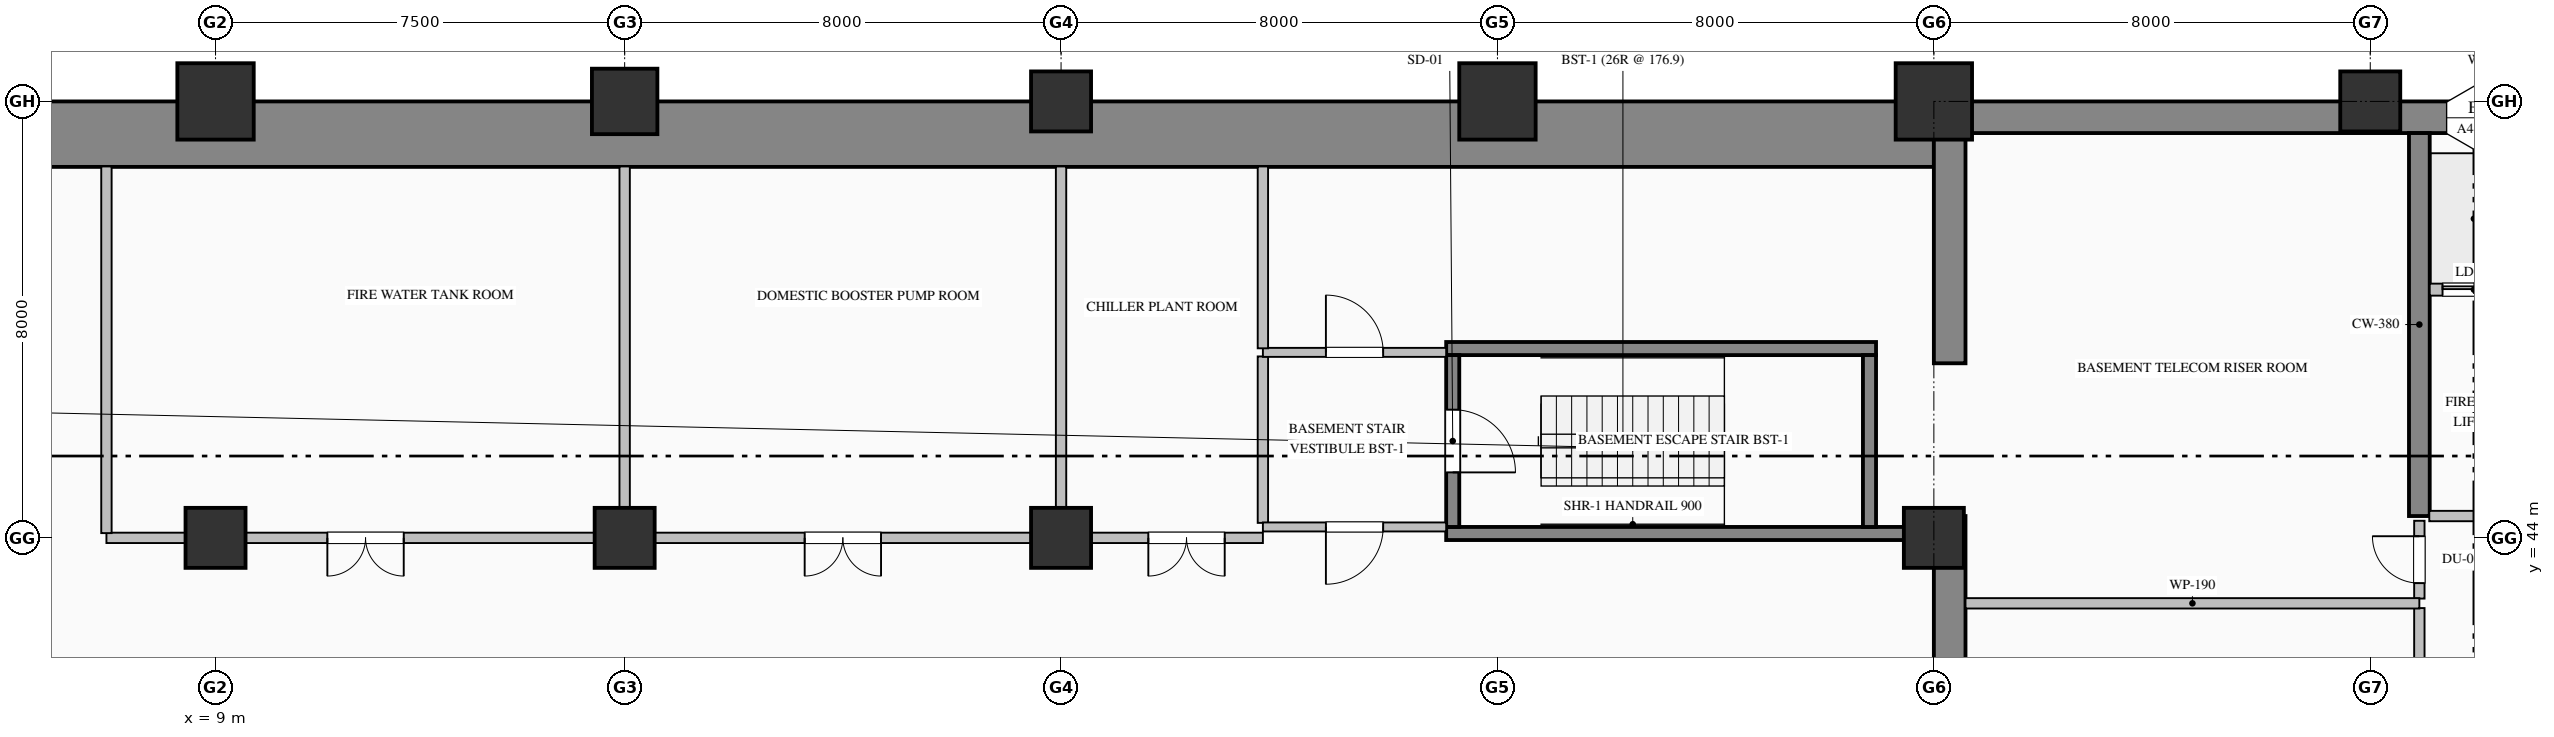
"""IFC4 building model, lengths in metres.
Left out: names, types, materials, properties, quantities, classifications, styles, units other than length and angle.
Written with IfcOpenShell. Run it as: python <this file> out.ifc"""

import sys

from ifc_helpers import new_model, si_unit, direction, frame, frame_2d, origin, origin_2d, place, context, subcontext, project, spatial, rectangle, hollow_rectangle, hollow_circle, extrude, element, fill, save


model = new_model("IFC4")
c1 = context("Model", 3, precision=1e-05, world=origin(), true_north=direction((0.0, 1.0)))
c2 = subcontext(c1, "Body", "Model", "MODEL_VIEW")
j1 = project(units=[si_unit("LENGTHUNIT", "METRE"), si_unit("PLANEANGLEUNIT", "RADIAN")], contexts=[c1])
p1 = place(None, origin())
s1 = spatial("IfcSite", under=j1, at=p1, CompositionType="ELEMENT")
p2 = place(p1, origin())
s2 = spatial("IfcBuilding", under=s1, at=p2, CompositionType="ELEMENT")
p3 = place(p2, frame((0.0, 0.0, -13.8)))
s3 = spatial("IfcBuildingStorey", under=s2, at=p3, CompositionType="ELEMENT", Elevation=-13.8)
p4 = place(p3, frame((-1.2, 51.4, -0.5), z_axis=(0.0, 0.0, 1.0), x_axis=(1.0, 0.0, 0.0)))
e1 = element("IfcWall", 1, at=p4, inside=s3, PredefinedType="USERDEFINED", context=c2, shape_type="SweptSolid", body=[
    extrude(rectangle(XDim=41.7, YDim=1.2, at=frame_2d((20.85, 0.0))), origin(), (0.0, 0.0, 1.0), 5.1),
])
p5 = place(p3, frame((40.5, 51.71, -0.5), z_axis=(0.0, 0.0, 1.0), x_axis=(1.0, 0.0, 0.0)))
e2 = element("IfcWall", 2, at=p5, inside=s3, PredefinedType="SHEAR", context=c2, shape_type="SweptSolid", body=[
    extrude(rectangle(XDim=23.5, YDim=0.58, at=frame_2d((11.75, 0.0))), origin(), (0.0, 0.0, 1.0), 4.74),
])
p6 = place(p3, frame((40.79, 36.58, -0.5), z_axis=(0.0, 0.0, 1.0), x_axis=(0.0, 1.0, 0.0)))
e3 = element("IfcWall", 3, at=p6, inside=s3, PredefinedType="SHEAR", context=c2, shape_type="SweptSolid", body=[
    extrude(rectangle(XDim=7.82, YDim=0.58, at=frame_2d((3.91, 0.0))), origin(), (0.0, 0.0, 1.0), 4.74),
])
p7 = place(p3, frame((40.79, 47.2, -0.5), z_axis=(0.0, 0.0, 1.0), x_axis=(0.0, 1.0, 0.0)))
e4 = element("IfcWall", 4, at=p7, inside=s3, PredefinedType="SHEAR", context=c2, shape_type="SweptSolid", body=[
    extrude(rectangle(XDim=4.22, YDim=0.58, at=frame_2d((2.11, 0.0))), origin(), (0.0, 0.0, 1.0), 4.74),
])
p8 = place(p3, frame((49.4, 44.4, -0.5), z_axis=(0.0, 0.0, 1.0), x_axis=(0.0, 1.0, 0.0)))
e5 = element("IfcWall", 5, at=p8, inside=s3, PredefinedType="SHEAR", context=c2, shape_type="SweptSolid", body=[
    extrude(rectangle(XDim=7.02, YDim=0.38, at=frame_2d((3.51, 0.0))), origin(), (0.0, 0.0, 1.0), 4.74),
])
p9 = place(p3, frame((9.0, 44.0, -0.5), z_axis=(0.0, 0.0, 1.0), x_axis=(1.0, 0.0, 0.0)))
e6 = element("IfcColumn", 6, at=p9, inside=s3, PredefinedType="COLUMN", context=c2, shape_type="SweptSolid", body=[
    extrude(rectangle(XDim=1.1, YDim=1.1, at=origin_2d()), origin(), (0.0, 0.0, 1.0), 5.1),
])
p10 = place(p3, frame((9.0, 52.0, -0.5), z_axis=(0.0, 0.0, 1.0), x_axis=(1.0, 0.0, 0.0)))
e7 = element("IfcColumn", 7, at=p10, inside=s3, PredefinedType="COLUMN", context=c2, shape_type="SweptSolid", body=[
    extrude(hollow_rectangle(XDim=1.4, YDim=1.4, WallThickness=0.05, at=origin_2d()), origin(), (0.0, 0.0, 1.0), 5.1),
])
p11 = place(p3, frame((16.5, 44.0, -0.5), z_axis=(0.0, 0.0, 1.0), x_axis=(1.0, 0.0, 0.0)))
e8 = element("IfcColumn", 8, at=p11, inside=s3, PredefinedType="COLUMN", context=c2, shape_type="SweptSolid", body=[
    extrude(rectangle(XDim=1.1, YDim=1.1, at=origin_2d()), origin(), (0.0, 0.0, 1.0), 5.1),
])
p12 = place(p3, frame((16.5, 52.0, -0.5), z_axis=(0.0, 0.0, 1.0), x_axis=(1.0, 0.0, 0.0)))
e9 = element("IfcColumn", 9, at=p12, inside=s3, PredefinedType="COLUMN", context=c2, shape_type="SweptSolid", body=[
    extrude(hollow_circle(Radius=0.6, WallThickness=0.04, at=origin_2d()), origin(), (0.0, 0.0, 1.0), 5.1),
])
p13 = place(p3, frame((24.5, 44.0, -0.5), z_axis=(0.0, 0.0, 1.0), x_axis=(1.0, 0.0, 0.0)))
e10 = element("IfcColumn", 10, at=p13, inside=s3, PredefinedType="COLUMN", context=c2, shape_type="SweptSolid", body=[
    extrude(rectangle(XDim=1.1, YDim=1.1, at=origin_2d()), origin(), (0.0, 0.0, 1.0), 5.1),
])
p14 = place(p3, frame((24.5, 52.0, -0.5), z_axis=(0.0, 0.0, 1.0), x_axis=(1.0, 0.0, 0.0)))
e11 = element("IfcColumn", 11, at=p14, inside=s3, PredefinedType="COLUMN", context=c2, shape_type="SweptSolid", body=[
    extrude(hollow_rectangle(XDim=1.1, YDim=1.1, WallThickness=0.04, at=origin_2d()), origin(), (0.0, 0.0, 1.0), 5.1),
])
p15 = place(p3, frame((32.5, 52.0, -0.5), z_axis=(0.0, 0.0, 1.0), x_axis=(1.0, 0.0, 0.0)))
e12 = element("IfcColumn", 12, at=p15, inside=s3, PredefinedType="COLUMN", context=c2, shape_type="SweptSolid", body=[
    extrude(hollow_rectangle(XDim=1.4, YDim=1.4, WallThickness=0.05, at=origin_2d()), origin(), (0.0, 0.0, 1.0), 5.1),
])
p16 = place(p3, frame((40.5, 44.0, -0.5), z_axis=(0.0, 0.0, 1.0), x_axis=(1.0, 0.0, 0.0)))
e13 = element("IfcColumn", 13, at=p16, inside=s3, PredefinedType="COLUMN", context=c2, shape_type="SweptSolid", body=[
    extrude(rectangle(XDim=1.1, YDim=1.1, at=origin_2d()), origin(), (0.0, 0.0, 1.0), 5.1),
])
p17 = place(p3, frame((40.5, 52.0, -0.5), z_axis=(0.0, 0.0, 1.0), x_axis=(1.0, 0.0, 0.0)))
e14 = element("IfcColumn", 14, at=p17, inside=s3, PredefinedType="COLUMN", context=c2, shape_type="SweptSolid", body=[
    extrude(hollow_rectangle(XDim=1.4, YDim=1.4, WallThickness=0.05, at=origin_2d()), origin(), (0.0, 0.0, 1.0), 5.1),
])
p18 = place(p3, frame((48.5, 52.0, -0.5), z_axis=(0.0, 0.0, 1.0), x_axis=(1.0, 0.0, 0.0)))
e15 = element("IfcColumn", 15, at=p18, inside=s3, PredefinedType="COLUMN", context=c2, shape_type="SweptSolid", body=[
    extrude(hollow_rectangle(XDim=1.1, YDim=1.1, WallThickness=0.04, at=origin_2d()), origin(), (0.0, 0.0, 1.0), 5.1),
])
p19 = place(p3, frame((31.56, 47.47, -0.5), z_axis=(0.0, 0.0, 1.0), x_axis=(1.0, 0.0, 0.0)))
e16 = element("IfcWall", 16, at=p19, inside=s3, PredefinedType="SOLIDWALL", context=c2, shape_type="SweptSolid", body=[
    extrude(rectangle(XDim=7.88, YDim=0.24, at=frame_2d((3.94, 0.0))), origin(), (0.0, 0.0, 1.0), 5.1),
])
p20 = place(p3, frame((39.97, 44.08, -0.5), z_axis=(0.0, 0.0, 1.0), x_axis=(-1.0, 0.0, 0.0)))
e17 = element("IfcWall", 17, at=p20, inside=s3, PredefinedType="SOLIDWALL", context=c2, shape_type="SweptSolid", body=[
    extrude(rectangle(XDim=8.41, YDim=0.24, at=frame_2d((4.205, 0.0))), origin(), (0.0, 0.0, 1.0), 5.1),
])
p21 = place(p3, frame((31.68, 47.35, -0.5), z_axis=(0.0, 0.0, 1.0), x_axis=(0.0, -1.0, 0.0)))
e18 = element("IfcWall", 18, at=p21, inside=s3, PredefinedType="SOLIDWALL", context=c2, shape_type="SweptSolid", body=[
    extrude(rectangle(XDim=3.15, YDim=0.24, at=frame_2d((1.575, 0.0))), origin(), (0.0, 0.0, 1.0), 5.1),
])
p22 = place(p21, frame((1.0, 0.0, 0.5)))
e19 = element("IfcOpeningElement", 19, at=p22, cuts=e18, PredefinedType="OPENING", context=c2, shape_type="SweptSolid", body=[
    extrude(rectangle(XDim=1.15, YDim=2.2, at=frame_2d((0.575, 1.1))), frame((0.0, 0.13, 0.0), z_axis=(0.0, -1.0, 0.0), x_axis=(1.0, 0.0, 0.0)), (0.0, 0.0, 1.0), 0.26),
])
p23 = place(p3, frame((39.32, 44.2, -0.5), z_axis=(0.0, 0.0, 1.0), x_axis=(0.0, 1.0, 0.0)))
e20 = element("IfcWall", 20, at=p23, inside=s3, PredefinedType="SOLIDWALL", context=c2, shape_type="SweptSolid", body=[
    extrude(rectangle(XDim=3.15, YDim=0.24, at=frame_2d((1.575, 0.0))), origin(), (0.0, 0.0, 1.0), 5.1),
])
p24 = place(p3, frame((54.71, 48.55, 0.0), z_axis=(0.0, 0.0, 1.0), x_axis=(-1.0, 0.0, 0.0)))
e21 = element("IfcWall", 21, at=p24, inside=s3, PredefinedType="PARTITIONING", context=c2, shape_type="SweptSolid", body=[
    extrude(rectangle(XDim=5.12, YDim=0.22, at=frame_2d((2.56, 0.0))), origin(), (0.0, 0.0, 1.0), 4.24),
])
p25 = place(p24, frame((3.735, 0.0, 0.0)))
e22 = element("IfcOpeningElement", 22, at=p25, cuts=e21, PredefinedType="OPENING", context=c2, shape_type="SweptSolid", body=[
    extrude(rectangle(XDim=1.15, YDim=2.2, at=frame_2d((0.575, 1.1))), frame((0.0, 0.12, 0.0), z_axis=(0.0, -1.0, 0.0), x_axis=(1.0, 0.0, 0.0)), (0.0, 0.0, 1.0), 0.24),
])
p26 = place(p24, frame((0.935, 0.0, 0.0)))
e23 = element("IfcOpeningElement", 23, at=p26, cuts=e21, PredefinedType="OPENING", context=c2, shape_type="SweptSolid", body=[
    extrude(rectangle(XDim=1.15, YDim=2.2, at=frame_2d((0.575, 1.1))), frame((0.0, 0.12, 0.0), z_axis=(0.0, -1.0, 0.0), x_axis=(1.0, 0.0, 0.0)), (0.0, 0.0, 1.0), 0.24),
])
p27 = place(p3, frame((54.718, 44.4, 0.0), z_axis=(0.0, 0.0, 1.0), x_axis=(-1.0, 0.0, 0.0)))
e24 = element("IfcWall", 24, at=p27, inside=s3, PredefinedType="PARTITIONING", context=c2, shape_type="SweptSolid", body=[
    extrude(rectangle(XDim=5.136, YDim=0.19, at=frame_2d((2.568, 0.0))), origin(), (0.0, 0.0, 1.0), 4.24),
])
p28 = place(p27, frame((2.043, 0.0, 0.0)))
e25 = element("IfcOpeningElement", 25, at=p28, cuts=e24, PredefinedType="OPENING", context=c2, shape_type="SweptSolid", body=[
    extrude(rectangle(XDim=1.05, YDim=2.15, at=frame_2d((0.525, 1.075))), frame((0.0, 0.105, 0.0), z_axis=(0.0, -1.0, 0.0), x_axis=(1.0, 0.0, 0.0)), (0.0, 0.0, 1.0), 0.21),
])
p29 = place(p3, frame((49.4, 36.58, 0.0), z_axis=(0.0, 0.0, 1.0), x_axis=(0.0, 1.0, 0.0)))
e26 = element("IfcWall", 26, at=p29, inside=s3, PredefinedType="PARTITIONING", context=c2, shape_type="SweptSolid", body=[
    extrude(rectangle(XDim=6.133, YDim=0.19, at=frame_2d((3.066, 0.0))), origin(), (0.0, 0.0, 1.0), 3.332),
])
p30 = place(p29, frame((2.366, 0.0, 0.0)))
e27 = element("IfcOpeningElement", 27, at=p30, cuts=e26, PredefinedType="OPENING", context=c2, shape_type="SweptSolid", body=[
    extrude(rectangle(XDim=1.4, YDim=2.25, at=frame_2d((0.7, 1.125))), frame((0.0, 0.105, 0.0), z_axis=(0.0, -1.0, 0.0), x_axis=(1.0, 0.0, 0.0)), (0.0, 0.0, 1.0), 0.21),
])
p31 = place(p3, frame((49.4, 42.887, 0.0), z_axis=(0.0, 0.0, 1.0), x_axis=(0.0, 1.0, 0.0)))
e28 = element("IfcWall", 28, at=p31, inside=s3, PredefinedType="PARTITIONING", context=c2, shape_type="SweptSolid", body=[
    extrude(rectangle(XDim=1.426, YDim=0.19, at=frame_2d((0.713, 0.0))), origin(), (0.0, 0.0, 1.0), 3.332),
])
p32 = place(p31, frame((0.283, 0.0, 0.0)))
e29 = element("IfcOpeningElement", 29, at=p32, cuts=e28, PredefinedType="OPENING", context=c2, shape_type="SweptSolid", body=[
    extrude(rectangle(XDim=0.86, YDim=2.1, at=frame_2d((0.43, 1.05))), frame((0.0, 0.105, 0.0), z_axis=(0.0, -1.0, 0.0), x_axis=(1.0, 0.0, 0.0)), (0.0, 0.0, 1.0), 0.21),
])
p33 = place(p3, frame((41.08, 42.8, 0.0), z_axis=(0.0, 0.0, 1.0), x_axis=(1.0, 0.0, 0.0)))
e30 = element("IfcWall", 30, at=p33, inside=s3, PredefinedType="PARTITIONING", context=c2, shape_type="SweptSolid", body=[
    extrude(rectangle(XDim=8.32, YDim=0.19, at=frame_2d((4.16, 0.0))), origin(), (0.0, 0.0, 1.0), 4.24),
])
p34 = place(p3, frame((28.2, 44.274, 0.0), z_axis=(0.0, 0.0, 1.0), x_axis=(0.0, 1.0, 0.0)))
e31 = element("IfcWall", 31, at=p34, inside=s3, PredefinedType="PARTITIONING", context=c2, shape_type="SweptSolid", body=[
    extrude(rectangle(XDim=3.051, YDim=0.19, at=frame_2d((1.525, 0.0))), origin(), (0.0, 0.0, 1.0), 4.24),
])
p35 = place(p3, frame((31.56, 44.2, 0.0), z_axis=(0.0, 0.0, 1.0), x_axis=(-1.0, 0.0, 0.0)))
e32 = element("IfcWall", 32, at=p35, inside=s3, PredefinedType="PARTITIONING", context=c2, shape_type="SweptSolid", body=[
    extrude(rectangle(XDim=3.36, YDim=0.165, at=frame_2d((1.68, 0.0))), origin(), (0.0, 0.0, 1.0), 4.24),
])
p36 = place(p35, frame((1.155, 0.0, 0.0)))
e33 = element("IfcOpeningElement", 33, at=p36, cuts=e32, PredefinedType="OPENING", context=c2, shape_type="SweptSolid", body=[
    extrude(rectangle(XDim=1.05, YDim=2.15, at=frame_2d((0.525, 1.075))), frame((0.0, 0.093, 0.0), z_axis=(0.0, -1.0, 0.0), x_axis=(1.0, 0.0, 0.0)), (0.0, 0.0, 1.0), 0.185),
])
p37 = place(p3, frame((28.2, 47.4, 0.0), z_axis=(0.0, 0.0, 1.0), x_axis=(1.0, 0.0, 0.0)))
e34 = element("IfcWall", 34, at=p37, inside=s3, PredefinedType="PARTITIONING", context=c2, shape_type="SweptSolid", body=[
    extrude(rectangle(XDim=3.36, YDim=0.165, at=frame_2d((1.68, 0.0))), origin(), (0.0, 0.0, 1.0), 4.24),
])
p38 = place(p37, frame((1.155, 0.0, 0.0)))
e35 = element("IfcOpeningElement", 35, at=p38, cuts=e34, PredefinedType="OPENING", context=c2, shape_type="SweptSolid", body=[
    extrude(rectangle(XDim=1.05, YDim=2.15, at=frame_2d((0.525, 1.075))), frame((0.0, 0.093, 0.0), z_axis=(0.0, -1.0, 0.0), x_axis=(1.0, 0.0, 0.0)), (0.0, 0.0, 1.0), 0.185),
])
p39 = place(p3, frame((16.5, 50.808, 0.0), z_axis=(0.0, 0.0, 1.0), x_axis=(0.0, -1.0, 0.0)))
e36 = element("IfcWall", 36, at=p39, inside=s3, PredefinedType="PARTITIONING", context=c2, shape_type="SweptSolid", body=[
    extrude(rectangle(XDim=6.721, YDim=0.19, at=frame_2d((3.361, 0.0))), origin(), (0.0, 0.0, 1.0), 3.332),
])
p40 = place(p3, frame((16.5, 44.0, 0.0), z_axis=(0.0, 0.0, 1.0), x_axis=(-1.0, 0.0, 0.0)))
e37 = element("IfcWall", 37, at=p40, inside=s3, PredefinedType="PARTITIONING", context=c2, shape_type="SweptSolid", body=[
    extrude(rectangle(XDim=9.5, YDim=0.19, at=frame_2d((4.75, 0.0))), origin(), (0.0, 0.0, 1.0), 3.332),
])
p41 = place(p40, frame((4.05, 0.0, 0.0)))
e38 = element("IfcOpeningElement", 38, at=p41, cuts=e37, PredefinedType="OPENING", context=c2, shape_type="SweptSolid", body=[
    extrude(rectangle(XDim=1.4, YDim=2.25, at=frame_2d((0.7, 1.125))), frame((0.0, 0.105, 0.0), z_axis=(0.0, -1.0, 0.0), x_axis=(1.0, 0.0, 0.0)), (0.0, 0.0, 1.0), 0.21),
])
p42 = place(p3, frame((7.0, 44.087, 0.0), z_axis=(0.0, 0.0, 1.0), x_axis=(0.0, 1.0, 0.0)))
e39 = element("IfcWall", 39, at=p42, inside=s3, PredefinedType="PARTITIONING", context=c2, shape_type="SweptSolid", body=[
    extrude(rectangle(XDim=6.721, YDim=0.19, at=frame_2d((3.361, 0.0))), origin(), (0.0, 0.0, 1.0), 4.24),
])
p43 = place(p3, frame((24.5, 50.808, 0.0), z_axis=(0.0, 0.0, 1.0), x_axis=(0.0, -1.0, 0.0)))
e40 = element("IfcWall", 40, at=p43, inside=s3, PredefinedType="PARTITIONING", context=c2, shape_type="SweptSolid", body=[
    extrude(rectangle(XDim=6.721, YDim=0.19, at=frame_2d((3.361, 0.0))), origin(), (0.0, 0.0, 1.0), 3.332),
])
p44 = place(p3, frame((24.5, 44.0, 0.0), z_axis=(0.0, 0.0, 1.0), x_axis=(-1.0, 0.0, 0.0)))
e41 = element("IfcWall", 41, at=p44, inside=s3, PredefinedType="PARTITIONING", context=c2, shape_type="SweptSolid", body=[
    extrude(rectangle(XDim=8.0, YDim=0.19, at=frame_2d((4.0, 0.0))), origin(), (0.0, 0.0, 1.0), 3.332),
])
p45 = place(p44, frame((3.3, 0.0, 0.0)))
e42 = element("IfcOpeningElement", 42, at=p45, cuts=e41, PredefinedType="OPENING", context=c2, shape_type="SweptSolid", body=[
    extrude(rectangle(XDim=1.4, YDim=2.25, at=frame_2d((0.7, 1.125))), frame((0.0, 0.105, 0.0), z_axis=(0.0, -1.0, 0.0), x_axis=(1.0, 0.0, 0.0)), (0.0, 0.0, 1.0), 0.21),
])
p46 = place(p3, frame((28.2, 44.0, 0.0), z_axis=(0.0, 0.0, 1.0), x_axis=(-1.0, 0.0, 0.0)))
e43 = element("IfcWall", 43, at=p46, inside=s3, PredefinedType="PARTITIONING", context=c2, shape_type="SweptSolid", body=[
    extrude(rectangle(XDim=3.7, YDim=0.19, at=frame_2d((1.85, 0.0))), origin(), (0.0, 0.0, 1.0), 4.24),
])
p47 = place(p46, frame((0.7, 0.0, 0.0)))
e44 = element("IfcOpeningElement", 44, at=p47, cuts=e43, PredefinedType="OPENING", context=c2, shape_type="SweptSolid", body=[
    extrude(rectangle(XDim=1.4, YDim=2.25, at=frame_2d((0.7, 1.125))), frame((0.0, 0.105, 0.0), z_axis=(0.0, -1.0, 0.0), x_axis=(1.0, 0.0, 0.0)), (0.0, 0.0, 1.0), 0.21),
])
p48 = place(p3, frame((28.2, 50.808, 0.0), z_axis=(0.0, 0.0, 1.0), x_axis=(0.0, -1.0, 0.0)))
e45 = element("IfcWall", 45, at=p48, inside=s3, PredefinedType="PARTITIONING", context=c2, shape_type="SweptSolid", body=[
    extrude(rectangle(XDim=3.333, YDim=0.19, at=frame_2d((1.667, 0.0))), origin(), (0.0, 0.0, 1.0), 4.24),
])
p49 = place(p22, origin())
e46 = element("IfcDoor", 46, at=p49, inside=s3, OperationType="SINGLE_SWING_RIGHT", PredefinedType="DOOR", context=c2, shape_type="SweptSolid", body=[
    extrude(rectangle(XDim=1.15, YDim=2.2, at=frame_2d((0.575, 1.1))), frame((0.0, 0.025, 0.0), z_axis=(0.0, -1.0, 0.0), x_axis=(1.0, 0.0, 0.0)), (0.0, 0.0, 1.0), 0.05),
])
fill(e19, e46)
p50 = place(p25, origin())
e47 = element("IfcDoor", 47, at=p50, inside=s3, OperationType="DOUBLE_DOOR_SLIDING", PredefinedType="DOOR", context=c2, shape_type="SweptSolid", body=[
    extrude(rectangle(XDim=1.15, YDim=2.2, at=frame_2d((0.575, 1.1))), frame((0.0, 0.025, 0.0), z_axis=(0.0, -1.0, 0.0), x_axis=(1.0, 0.0, 0.0)), (0.0, 0.0, 1.0), 0.05),
])
fill(e22, e47)
p51 = place(p36, origin())
e48 = element("IfcDoor", 48, at=p51, inside=s3, OperationType="SINGLE_SWING_RIGHT", PredefinedType="DOOR", context=c2, shape_type="SweptSolid", body=[
    extrude(rectangle(XDim=1.05, YDim=2.15, at=frame_2d((0.525, 1.075))), frame((0.0, 0.025, 0.0), z_axis=(0.0, -1.0, 0.0), x_axis=(1.0, 0.0, 0.0)), (0.0, 0.0, 1.0), 0.05),
])
fill(e33, e48)
p52 = place(p38, origin())
e49 = element("IfcDoor", 49, at=p52, inside=s3, OperationType="SINGLE_SWING_LEFT", PredefinedType="DOOR", context=c2, shape_type="SweptSolid", body=[
    extrude(rectangle(XDim=1.05, YDim=2.15, at=frame_2d((0.525, 1.075))), frame((0.0, 0.025, 0.0), z_axis=(0.0, -1.0, 0.0), x_axis=(1.0, 0.0, 0.0)), (0.0, 0.0, 1.0), 0.05),
])
fill(e35, e49)
p53 = place(p32, origin())
e50 = element("IfcDoor", 50, at=p53, inside=s3, OperationType="SINGLE_SWING_RIGHT", PredefinedType="DOOR", context=c2, shape_type="SweptSolid", body=[
    extrude(rectangle(XDim=0.86, YDim=2.1, at=frame_2d((0.43, 1.05))), frame((0.0, 0.025, 0.0), z_axis=(0.0, -1.0, 0.0), x_axis=(1.0, 0.0, 0.0)), (0.0, 0.0, 1.0), 0.05),
])
fill(e29, e50)
p54 = place(p41, origin())
e51 = element("IfcDoor", 51, at=p54, inside=s3, OperationType="DOUBLE_DOOR_SINGLE_SWING", PredefinedType="DOOR", context=c2, shape_type="SweptSolid", body=[
    extrude(rectangle(XDim=1.4, YDim=2.25, at=frame_2d((0.7, 1.125))), frame((0.0, 0.025, 0.0), z_axis=(0.0, -1.0, 0.0), x_axis=(1.0, 0.0, 0.0)), (0.0, 0.0, 1.0), 0.05),
])
fill(e38, e51)
p55 = place(p45, origin())
e52 = element("IfcDoor", 52, at=p55, inside=s3, OperationType="DOUBLE_DOOR_SINGLE_SWING", PredefinedType="DOOR", context=c2, shape_type="SweptSolid", body=[
    extrude(rectangle(XDim=1.4, YDim=2.25, at=frame_2d((0.7, 1.125))), frame((0.0, 0.025, 0.0), z_axis=(0.0, -1.0, 0.0), x_axis=(1.0, 0.0, 0.0)), (0.0, 0.0, 1.0), 0.05),
])
fill(e42, e52)
p56 = place(p47, origin())
e53 = element("IfcDoor", 53, at=p56, inside=s3, OperationType="DOUBLE_DOOR_SINGLE_SWING", PredefinedType="DOOR", context=c2, shape_type="SweptSolid", body=[
    extrude(rectangle(XDim=1.4, YDim=2.25, at=frame_2d((0.7, 1.125))), frame((0.0, 0.025, 0.0), z_axis=(0.0, -1.0, 0.0), x_axis=(1.0, 0.0, 0.0)), (0.0, 0.0, 1.0), 0.05),
])
fill(e44, e53)
save(model, sys.argv[1])
